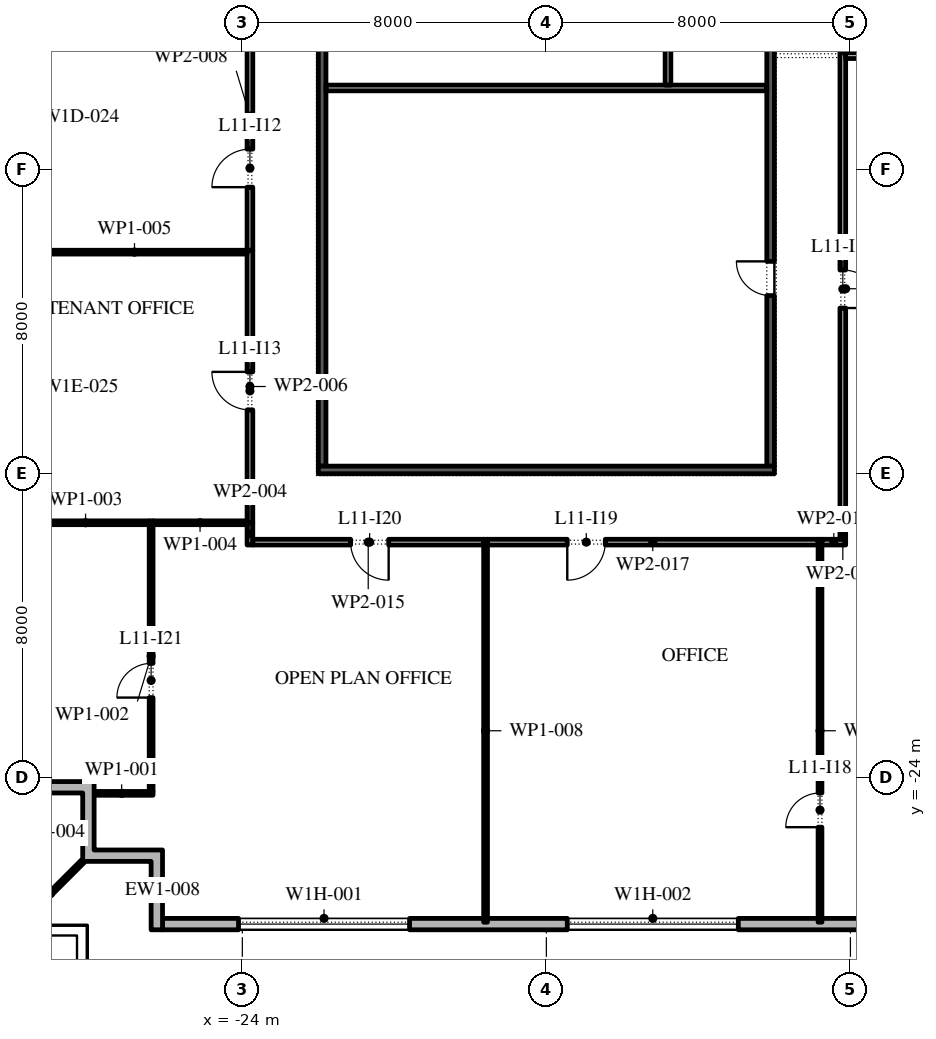
"""IFC4 building model, lengths in metres.
Left out: names, types, materials, properties, quantities, classifications, styles, units other than length and angle.
Written with IfcOpenShell. Run it as: python <this file> out.ifc"""

import sys

from ifc_helpers import new_model, si_unit, direction, frame, frame_2d, origin, place, context, subcontext, project, spatial, polyline, rectangle, outline, extrude, element, fill, save


model = new_model("IFC4")
c1 = context("Model", 3, precision=1e-05, world=origin(), true_north=direction((0.0, 1.0)))
c2 = subcontext(c1, "Body", "Model", "MODEL_VIEW")
j1 = project(units=[si_unit("LENGTHUNIT", "METRE"), si_unit("PLANEANGLEUNIT", "RADIAN")], contexts=[c1])
p1 = place(None, origin())
s1 = spatial("IfcSite", under=j1, at=p1, CompositionType="ELEMENT")
p2 = place(p1, origin())
s2 = spatial("IfcBuilding", under=s1, at=p2, CompositionType="ELEMENT")
p3 = place(p2, frame((0.0, 0.0, 56.4)))
s3 = spatial("IfcBuildingStorey", under=s2, at=p3, CompositionType="ELEMENT", Elevation=56.4)
p4 = place(p3, frame((-26.1, -27.85, 0.0), z_axis=(0.0, 0.0, 1.0), x_axis=(1.0, 0.0, 0.0)))
e1 = element("IfcWall", 1, at=p4, inside=s3, PredefinedType="STANDARD", context=c2, shape_type="SweptSolid", body=[
    extrude(rectangle(XDim=52.5, YDim=0.3, at=frame_2d((26.25, 0.0))), origin(), (0.0, 0.0, 1.0), 4.0),
])
p5 = place(p4, frame((2.0, 0.0, 0.45)))
e2 = element("IfcOpeningElement", 2, at=p5, cuts=e1, PredefinedType="OPENING", context=c2, shape_type="SweptSolid", body=[
    extrude(rectangle(XDim=4.5, YDim=2.75, at=frame_2d((2.25, 1.375))), frame((0.0, 0.16, 0.0), z_axis=(0.0, -1.0, 0.0), x_axis=(1.0, 0.0, 0.0)), (0.0, 0.0, 1.0), 0.32),
])
p6 = place(p4, frame((10.65, 0.0, 0.45)))
e3 = element("IfcOpeningElement", 3, at=p6, cuts=e1, PredefinedType="OPENING", context=c2, shape_type="SweptSolid", body=[
    extrude(rectangle(XDim=4.5, YDim=2.75, at=frame_2d((2.25, 1.375))), frame((0.0, 0.16, 0.0), z_axis=(0.0, -1.0, 0.0), x_axis=(1.0, 0.0, 0.0)), (0.0, 0.0, 1.0), 0.32),
])
p7 = place(p4, frame((20.5, 0.0, 0.0)))
e4 = element("IfcOpeningElement", 4, at=p7, cuts=e1, PredefinedType="OPENING", context=c2, shape_type="SweptSolid", body=[
    extrude(rectangle(XDim=2.4, YDim=3.5, at=frame_2d((1.2, 1.75))), frame((0.0, 0.16, 0.0), z_axis=(0.0, -1.0, 0.0), x_axis=(1.0, 0.0, 0.0)), (0.0, 0.0, 1.0), 0.32),
])
p8 = place(p4, frame((28.25, 0.0, 0.45)))
e5 = element("IfcOpeningElement", 5, at=p8, cuts=e1, PredefinedType="OPENING", context=c2, shape_type="SweptSolid", body=[
    extrude(rectangle(XDim=4.5, YDim=2.75, at=frame_2d((2.25, 1.375))), frame((0.0, 0.16, 0.0), z_axis=(0.0, -1.0, 0.0), x_axis=(1.0, 0.0, 0.0)), (0.0, 0.0, 1.0), 0.32),
])
p9 = place(p4, frame((37.05, 0.0, 0.45)))
e6 = element("IfcOpeningElement", 6, at=p9, cuts=e1, PredefinedType="OPENING", context=c2, shape_type="SweptSolid", body=[
    extrude(rectangle(XDim=4.5, YDim=2.75, at=frame_2d((2.25, 1.375))), frame((0.0, 0.16, 0.0), z_axis=(0.0, -1.0, 0.0), x_axis=(1.0, 0.0, 0.0)), (0.0, 0.0, 1.0), 0.32),
])
p10 = place(p4, frame((45.85, 0.0, 0.45)))
e7 = element("IfcOpeningElement", 7, at=p10, cuts=e1, PredefinedType="OPENING", context=c2, shape_type="SweptSolid", body=[
    extrude(rectangle(XDim=4.5, YDim=2.75, at=frame_2d((2.25, 1.375))), frame((0.0, 0.16, 0.0), z_axis=(0.0, -1.0, 0.0), x_axis=(1.0, 0.0, 0.0)), (0.0, 0.0, 1.0), 0.32),
])
p11 = place(p3, origin())
e8 = element("IfcWall", 8, at=p11, inside=s3, PredefinedType="STANDARD", context=c2, shape_type="SweptSolid", body=[
    extrude(outline(polyline([(-26.4, -26.2), (-28.2, -26.2), (-28.2, -24.4), (-29.7, -24.4), (-29.7, -24.1), (-27.9, -24.1), (-27.9, -25.9), (-26.1, -25.9), (-26.1, -28.0), (-26.4, -28.0), (-26.4, -26.2)])), origin(), (0.0, 0.0, 1.0), 4.0),
])
p12 = place(p3, frame((-28.2, -26.2, -0.05), z_axis=(0.0, 0.0, 1.0), x_axis=(-0.707106781187, -0.707106781187, 0.0)))
e9 = element("IfcWall", 9, at=p12, inside=s3, PredefinedType="STANDARD", context=c2, shape_type="SweptSolid", body=[
    extrude(rectangle(XDim=2.385, YDim=0.1, at=frame_2d((1.192, 0.0))), origin(), (0.0, 0.0, 1.0), 4.05),
])
p13 = place(p3, frame((-21.9, -15.8, 0.0), z_axis=(0.0, 0.0, 1.0), x_axis=(0.0, 1.0, 0.0)))
e10 = element("IfcWall", 10, at=p13, inside=s3, PredefinedType="SHEAR", context=c2, shape_type="SweptSolid", body=[
    extrude(rectangle(XDim=13.05, YDim=0.2, at=frame_2d((6.525, 0.0))), origin(), (0.0, 0.0, 1.0), 4.0),
])
p14 = place(p13, frame((11.087, 0.0, 0.0)))
e11 = element("IfcOpeningElement", 11, at=p14, cuts=e10, PredefinedType="OPENING", context=c2, shape_type="SweptSolid", body=[
    extrude(rectangle(XDim=0.9, YDim=2.1, at=frame_2d((0.45, 1.05))), frame((0.0, 0.11, 0.0), z_axis=(0.0, -1.0, 0.0), x_axis=(1.0, 0.0, 0.0)), (0.0, 0.0, 1.0), 0.22),
])
p15 = place(p3, frame((-10.1, -15.8, 0.0), z_axis=(0.0, 0.0, 1.0), x_axis=(0.0, 1.0, 0.0)))
e12 = element("IfcWall", 12, at=p15, inside=s3, PredefinedType="SHEAR", context=c2, shape_type="SweptSolid", body=[
    extrude(rectangle(XDim=13.05, YDim=0.2, at=frame_2d((6.525, 0.0))), origin(), (0.0, 0.0, 1.0), 4.0),
])
p16 = place(p15, frame((4.488, 0.0, 0.0)))
e13 = element("IfcOpeningElement", 13, at=p16, cuts=e12, PredefinedType="OPENING", context=c2, shape_type="SweptSolid", body=[
    extrude(rectangle(XDim=0.9, YDim=2.1, at=frame_2d((0.45, 1.05))), frame((0.0, 0.11, 0.0), z_axis=(0.0, -1.0, 0.0), x_axis=(1.0, 0.0, 0.0)), (0.0, 0.0, 1.0), 0.22),
])
p17 = place(p15, frame((11.038, 0.0, 0.0)))
e14 = element("IfcOpeningElement", 14, at=p17, cuts=e12, PredefinedType="OPENING", context=c2, shape_type="SweptSolid", body=[
    extrude(rectangle(XDim=1.0, YDim=2.1, at=frame_2d((0.5, 1.05))), frame((0.0, 0.11, 0.0), z_axis=(0.0, -1.0, 0.0), x_axis=(1.0, 0.0, 0.0)), (0.0, 0.0, 1.0), 0.22),
])
p18 = place(p3, frame((-22.0, -15.9, 0.0), z_axis=(0.0, 0.0, 1.0), x_axis=(1.0, 0.0, 0.0)))
e15 = element("IfcWall", 15, at=p18, inside=s3, PredefinedType="SHEAR", context=c2, shape_type="SweptSolid", body=[
    extrude(rectangle(XDim=12.0, YDim=0.2, at=frame_2d((6.0, 0.0))), origin(), (0.0, 0.0, 1.0), 4.0),
])
p19 = place(p3, frame((-21.8, -5.85, 0.0), z_axis=(0.0, 0.0, 1.0), x_axis=(1.0, 0.0, 0.0)))
e16 = element("IfcWall", 16, at=p19, inside=s3, PredefinedType="PARTITIONING", context=c2, shape_type="SweptSolid", body=[
    extrude(rectangle(XDim=11.6, YDim=0.15, at=frame_2d((5.8, 0.0))), origin(), (0.0, 0.0, 1.0), 4.0),
])
p20 = place(p3, frame((-12.8, -5.775, 0.0), z_axis=(0.0, 0.0, 1.0), x_axis=(0.0, 1.0, 0.0)))
e17 = element("IfcWall", 17, at=p20, inside=s3, PredefinedType="PARTITIONING", context=c2, shape_type="SweptSolid", body=[
    extrude(rectangle(XDim=3.025, YDim=0.15, at=frame_2d((1.512, 0.0))), origin(), (0.0, 0.0, 1.0), 4.0),
])
p21 = place(p3, frame((-28.0, -24.41, 0.0), z_axis=(0.0, 0.0, 1.0), x_axis=(1.0, 0.0, 0.0)))
e18 = element("IfcWall", 18, at=p21, inside=s3, PredefinedType="PARTITIONING", context=c2, shape_type="SweptSolid", body=[
    extrude(rectangle(XDim=1.65, YDim=0.1, at=frame_2d((0.825, 0.0))), origin(), (0.0, 0.0, 1.0), 4.0),
])
p22 = place(p3, frame((-26.4, -24.36, 0.0), z_axis=(0.0, 0.0, 1.0), x_axis=(0.0, 1.0, 0.0)))
e19 = element("IfcWall", 19, at=p22, inside=s3, PredefinedType="PARTITIONING", context=c2, shape_type="SweptSolid", body=[
    extrude(rectangle(XDim=7.12, YDim=0.1, at=frame_2d((3.56, 0.0))), origin(), (0.0, 0.0, 1.0), 4.0),
])
p23 = place(p22, frame((2.47, 0.0, 0.0)))
e20 = element("IfcOpeningElement", 20, at=p23, cuts=e19, PredefinedType="OPENING", context=c2, shape_type="SweptSolid", body=[
    extrude(rectangle(XDim=0.9, YDim=2.1, at=frame_2d((0.45, 1.05))), frame((0.0, 0.06, 0.0), z_axis=(0.0, -1.0, 0.0), x_axis=(1.0, 0.0, 0.0)), (0.0, 0.0, 1.0), 0.12),
])
p24 = place(p3, frame((-26.45, -17.29, 0.0), z_axis=(0.0, 0.0, 1.0), x_axis=(-1.0, 0.0, 0.0)))
e21 = element("IfcWall", 21, at=p24, inside=s3, PredefinedType="PARTITIONING", context=c2, shape_type="SweptSolid", body=[
    extrude(rectangle(XDim=3.35, YDim=0.1, at=frame_2d((1.675, 0.0))), origin(), (0.0, 0.0, 1.0), 4.0),
])
p25 = place(p3, frame((-23.8, -17.875, 0.0), z_axis=(0.0, 0.0, 1.0), x_axis=(0.0, 1.0, 0.0)))
e22 = element("IfcWall", 22, at=p25, inside=s3, PredefinedType="PARTITIONING", context=c2, shape_type="SweptSolid", body=[
    extrude(rectangle(XDim=0.585, YDim=0.15, at=frame_2d((0.292, 0.0))), origin(), (0.0, 0.0, 1.0), 4.0),
])
p26 = place(p3, frame((-23.875, -17.29, 0.0), z_axis=(0.0, 0.0, 1.0), x_axis=(-1.0, 0.0, 0.0)))
e23 = element("IfcWall", 23, at=p26, inside=s3, PredefinedType="PARTITIONING", context=c2, shape_type="SweptSolid", body=[
    extrude(rectangle(XDim=2.475, YDim=0.1, at=frame_2d((1.238, 0.0))), origin(), (0.0, 0.0, 1.0), 4.0),
])
p27 = place(p3, frame((-23.8, -17.29, 0.0), z_axis=(0.0, 0.0, 1.0), x_axis=(0.0, 1.0, 0.0)))
e24 = element("IfcWall", 24, at=p27, inside=s3, PredefinedType="PARTITIONING", context=c2, shape_type="SweptSolid", body=[
    extrude(rectangle(XDim=7.17, YDim=0.15, at=frame_2d((3.585, 0.0))), origin(), (0.0, 0.0, 1.0), 4.0),
])
p28 = place(p27, frame((2.97, 0.0, 0.0)))
e25 = element("IfcOpeningElement", 25, at=p28, cuts=e24, PredefinedType="OPENING", context=c2, shape_type="SweptSolid", body=[
    extrude(rectangle(XDim=1.0, YDim=2.1, at=frame_2d((0.5, 1.05))), frame((0.0, 0.085, 0.0), z_axis=(0.0, -1.0, 0.0), x_axis=(1.0, 0.0, 0.0)), (0.0, 0.0, 1.0), 0.17),
])
p29 = place(p3, frame((-23.875, -10.17, 0.0), z_axis=(0.0, 0.0, 1.0), x_axis=(-1.0, 0.0, 0.0)))
e26 = element("IfcWall", 26, at=p29, inside=s3, PredefinedType="PARTITIONING", context=c2, shape_type="SweptSolid", body=[
    extrude(rectangle(XDim=5.925, YDim=0.1, at=frame_2d((2.962, 0.0))), origin(), (0.0, 0.0, 1.0), 4.0),
])
p30 = place(p3, frame((-23.8, -10.12, 0.0), z_axis=(0.0, 0.0, 1.0), x_axis=(0.0, 1.0, 0.0)))
e27 = element("IfcWall", 27, at=p30, inside=s3, PredefinedType="PARTITIONING", context=c2, shape_type="SweptSolid", body=[
    extrude(rectangle(XDim=7.06, YDim=0.15, at=frame_2d((3.53, 0.0))), origin(), (0.0, 0.0, 1.0), 4.0),
])
p31 = place(p30, frame((1.66, 0.0, 0.0)))
e28 = element("IfcOpeningElement", 28, at=p31, cuts=e27, PredefinedType="OPENING", context=c2, shape_type="SweptSolid", body=[
    extrude(rectangle(XDim=1.0, YDim=2.1, at=frame_2d((0.5, 1.05))), frame((0.0, 0.085, 0.0), z_axis=(0.0, -1.0, 0.0), x_axis=(1.0, 0.0, 0.0)), (0.0, 0.0, 1.0), 0.17),
])
p32 = place(p3, frame((-17.6, -27.8, 0.0), z_axis=(0.0, 0.0, 1.0), x_axis=(0.0, 1.0, 0.0)))
e29 = element("IfcWall", 29, at=p32, inside=s3, PredefinedType="PARTITIONING", context=c2, shape_type="SweptSolid", body=[
    extrude(rectangle(XDim=10.075, YDim=0.1, at=frame_2d((5.038, 0.0))), origin(), (0.0, 0.0, 1.0), 4.0),
])
p33 = place(p3, frame((-17.65, -17.8, 0.0), z_axis=(0.0, 0.0, 1.0), x_axis=(-1.0, 0.0, 0.0)))
e30 = element("IfcWall", 30, at=p33, inside=s3, PredefinedType="PARTITIONING", context=c2, shape_type="SweptSolid", body=[
    extrude(rectangle(XDim=6.075, YDim=0.15, at=frame_2d((3.038, 0.0))), origin(), (0.0, 0.0, 1.0), 4.0),
])
p34 = place(p33, frame((2.5, 0.0, 0.0)))
e31 = element("IfcOpeningElement", 31, at=p34, cuts=e30, PredefinedType="OPENING", context=c2, shape_type="SweptSolid", body=[
    extrude(rectangle(XDim=1.0, YDim=2.1, at=frame_2d((0.5, 1.05))), frame((0.0, 0.085, 0.0), z_axis=(0.0, -1.0, 0.0), x_axis=(1.0, 0.0, 0.0)), (0.0, 0.0, 1.0), 0.17),
])
p35 = place(p3, frame((-8.8, -27.8, 0.0), z_axis=(0.0, 0.0, 1.0), x_axis=(0.0, 1.0, 0.0)))
e32 = element("IfcWall", 32, at=p35, inside=s3, PredefinedType="PARTITIONING", context=c2, shape_type="SweptSolid", body=[
    extrude(rectangle(XDim=10.075, YDim=0.1, at=frame_2d((5.038, 0.0))), origin(), (0.0, 0.0, 1.0), 4.0),
])
p36 = place(p35, frame((2.5, 0.0, 0.0)))
e33 = element("IfcOpeningElement", 33, at=p36, cuts=e32, PredefinedType="OPENING", context=c2, shape_type="SweptSolid", body=[
    extrude(rectangle(XDim=0.9, YDim=2.1, at=frame_2d((0.45, 1.05))), frame((0.0, 0.06, 0.0), z_axis=(0.0, -1.0, 0.0), x_axis=(1.0, 0.0, 0.0)), (0.0, 0.0, 1.0), 0.12),
])
p37 = place(p3, frame((-8.85, -17.8, 0.0), z_axis=(0.0, 0.0, 1.0), x_axis=(-1.0, 0.0, 0.0)))
e34 = element("IfcWall", 34, at=p37, inside=s3, PredefinedType="PARTITIONING", context=c2, shape_type="SweptSolid", body=[
    extrude(rectangle(XDim=8.7, YDim=0.15, at=frame_2d((4.35, 0.0))), origin(), (0.0, 0.0, 1.0), 4.0),
])
p38 = place(p37, frame((5.6, 0.0, 0.0)))
e35 = element("IfcOpeningElement", 35, at=p38, cuts=e34, PredefinedType="OPENING", context=c2, shape_type="SweptSolid", body=[
    extrude(rectangle(XDim=1.0, YDim=2.1, at=frame_2d((0.5, 1.05))), frame((0.0, 0.085, 0.0), z_axis=(0.0, -1.0, 0.0), x_axis=(1.0, 0.0, 0.0)), (0.0, 0.0, 1.0), 0.17),
])
p39 = place(p3, frame((-8.125, -17.8, 0.0), z_axis=(0.0, 0.0, 1.0), x_axis=(-1.0, 0.0, 0.0)))
e36 = element("IfcWall", 36, at=p39, inside=s3, PredefinedType="PARTITIONING", context=c2, shape_type="SweptSolid", body=[
    extrude(rectangle(XDim=0.625, YDim=0.15, at=frame_2d((0.312, 0.0))), origin(), (0.0, 0.0, 1.0), 4.0),
])
p40 = place(p3, frame((-8.2, -17.34, 0.0), z_axis=(0.0, 0.0, 1.0), x_axis=(0.0, -1.0, 0.0)))
e37 = element("IfcWall", 37, at=p40, inside=s3, PredefinedType="PARTITIONING", context=c2, shape_type="SweptSolid", body=[
    extrude(rectangle(XDim=0.385, YDim=0.15, at=frame_2d((0.192, 0.0))), origin(), (0.0, 0.0, 1.0), 4.0),
])
p41 = place(p3, frame((-8.2, -4.925, 0.0), z_axis=(0.0, 0.0, 1.0), x_axis=(0.0, -1.0, 0.0)))
e38 = element("IfcWall", 38, at=p41, inside=s3, PredefinedType="PARTITIONING", context=c2, shape_type="SweptSolid", body=[
    extrude(rectangle(XDim=12.415, YDim=0.15, at=frame_2d((6.208, 0.0))), origin(), (0.0, 0.0, 1.0), 4.0),
])
p42 = place(p41, frame((5.715, 0.0, 0.0)))
e39 = element("IfcOpeningElement", 39, at=p42, cuts=e38, PredefinedType="OPENING", context=c2, shape_type="SweptSolid", body=[
    extrude(rectangle(XDim=1.0, YDim=2.1, at=frame_2d((0.5, 1.05))), frame((0.0, 0.085, 0.0), z_axis=(0.0, -1.0, 0.0), x_axis=(1.0, 0.0, 0.0)), (0.0, 0.0, 1.0), 0.17),
])
p43 = place(p3, frame((-2.45, -17.29, 0.0), z_axis=(0.0, 0.0, 1.0), x_axis=(-1.0, 0.0, 0.0)))
e40 = element("IfcWall", 40, at=p43, inside=s3, PredefinedType="PARTITIONING", context=c2, shape_type="SweptSolid", body=[
    extrude(rectangle(XDim=5.675, YDim=0.1, at=frame_2d((2.837, 0.0))), origin(), (0.0, 0.0, 1.0), 4.0),
])
p44 = place(p3, frame((-2.55, -5.0, 0.0), z_axis=(0.0, 0.0, 1.0), x_axis=(-1.0, 0.0, 0.0)))
e41 = element("IfcWall", 41, at=p44, inside=s3, PredefinedType="PARTITIONING", context=c2, shape_type="SweptSolid", body=[
    extrude(rectangle(XDim=5.575, YDim=0.15, at=frame_2d((2.788, 0.0))), origin(), (0.0, 0.0, 1.0), 4.0),
])
p45 = place(p5, origin())
e42 = element("IfcWindow", 42, at=p45, inside=s3, PartitioningType="DOUBLE_PANEL_VERTICAL", PredefinedType="WINDOW", context=c2, shape_type="SweptSolid", body=[
    extrude(rectangle(XDim=4.5, YDim=2.75, at=frame_2d((2.25, 1.375))), frame((0.0, 0.03, 0.0), z_axis=(0.0, -1.0, 0.0), x_axis=(1.0, 0.0, 0.0)), (0.0, 0.0, 1.0), 0.06),
])
fill(e2, e42)
p46 = place(p6, origin())
e43 = element("IfcWindow", 43, at=p46, inside=s3, PartitioningType="DOUBLE_PANEL_VERTICAL", PredefinedType="WINDOW", context=c2, shape_type="SweptSolid", body=[
    extrude(rectangle(XDim=4.5, YDim=2.75, at=frame_2d((2.25, 1.375))), frame((0.0, 0.03, 0.0), z_axis=(0.0, -1.0, 0.0), x_axis=(1.0, 0.0, 0.0)), (0.0, 0.0, 1.0), 0.06),
])
fill(e3, e43)
p47 = place(p16, origin())
e44 = element("IfcDoor", 44, at=p47, inside=s3, OperationType="SINGLE_SWING_LEFT", PredefinedType="DOOR", context=c2, shape_type="SweptSolid", body=[
    extrude(rectangle(XDim=0.9, YDim=2.1, at=frame_2d((0.45, 1.05))), frame((0.0, 0.1, 0.0), z_axis=(0.0, -1.0, 0.0), x_axis=(1.0, 0.0, 0.0)), (0.0, 0.0, 1.0), 0.05),
])
fill(e13, e44)
p48 = place(p42, origin())
e45 = element("IfcDoor", 45, at=p48, inside=s3, OperationType="SINGLE_SWING_LEFT", PredefinedType="DOOR", context=c2, shape_type="SweptSolid", body=[
    extrude(rectangle(XDim=1.0, YDim=2.1, at=frame_2d((0.5, 1.05))), frame((0.0, 0.025, 0.0), z_axis=(0.0, -1.0, 0.0), x_axis=(1.0, 0.0, 0.0)), (0.0, 0.0, 1.0), 0.05),
])
fill(e39, e45)
p49 = place(p31, origin())
e46 = element("IfcDoor", 46, at=p49, inside=s3, OperationType="SINGLE_SWING_RIGHT", PredefinedType="DOOR", context=c2, shape_type="SweptSolid", body=[
    extrude(rectangle(XDim=1.0, YDim=2.1, at=frame_2d((0.5, 1.05))), frame((0.0, 0.025, 0.0), z_axis=(0.0, -1.0, 0.0), x_axis=(1.0, 0.0, 0.0)), (0.0, 0.0, 1.0), 0.05),
])
fill(e28, e46)
p50 = place(p28, origin())
e47 = element("IfcDoor", 47, at=p50, inside=s3, OperationType="SINGLE_SWING_LEFT", PredefinedType="DOOR", context=c2, shape_type="SweptSolid", body=[
    extrude(rectangle(XDim=1.0, YDim=2.1, at=frame_2d((0.5, 1.05))), frame((0.0, 0.025, 0.0), z_axis=(0.0, -1.0, 0.0), x_axis=(1.0, 0.0, 0.0)), (0.0, 0.0, 1.0), 0.05),
])
fill(e25, e47)
p51 = place(p36, origin())
e48 = element("IfcDoor", 48, at=p51, inside=s3, OperationType="SINGLE_SWING_RIGHT", PredefinedType="DOOR", context=c2, shape_type="SweptSolid", body=[
    extrude(rectangle(XDim=0.9, YDim=2.1, at=frame_2d((0.45, 1.05))), frame((0.0, 0.025, 0.0), z_axis=(0.0, -1.0, 0.0), x_axis=(1.0, 0.0, 0.0)), (0.0, 0.0, 1.0), 0.05),
])
fill(e33, e48)
p52 = place(p38, origin())
e49 = element("IfcDoor", 49, at=p52, inside=s3, OperationType="SINGLE_SWING_LEFT", PredefinedType="DOOR", context=c2, shape_type="SweptSolid", body=[
    extrude(rectangle(XDim=1.0, YDim=2.1, at=frame_2d((0.5, 1.05))), frame((0.0, 0.025, 0.0), z_axis=(0.0, -1.0, 0.0), x_axis=(1.0, 0.0, 0.0)), (0.0, 0.0, 1.0), 0.05),
])
fill(e35, e49)
p53 = place(p34, origin())
e50 = element("IfcDoor", 50, at=p53, inside=s3, OperationType="SINGLE_SWING_RIGHT", PredefinedType="DOOR", context=c2, shape_type="SweptSolid", body=[
    extrude(rectangle(XDim=1.0, YDim=2.1, at=frame_2d((0.5, 1.05))), frame((0.0, 0.025, 0.0), z_axis=(0.0, -1.0, 0.0), x_axis=(1.0, 0.0, 0.0)), (0.0, 0.0, 1.0), 0.05),
])
fill(e31, e50)
p54 = place(p23, origin())
e51 = element("IfcDoor", 51, at=p54, inside=s3, OperationType="SINGLE_SWING_RIGHT", PredefinedType="DOOR", context=c2, shape_type="SweptSolid", body=[
    extrude(rectangle(XDim=0.9, YDim=2.1, at=frame_2d((0.45, 1.05))), frame((0.0, 0.025, 0.0), z_axis=(0.0, -1.0, 0.0), x_axis=(1.0, 0.0, 0.0)), (0.0, 0.0, 1.0), 0.05),
])
fill(e20, e51)
save(model, sys.argv[1])
